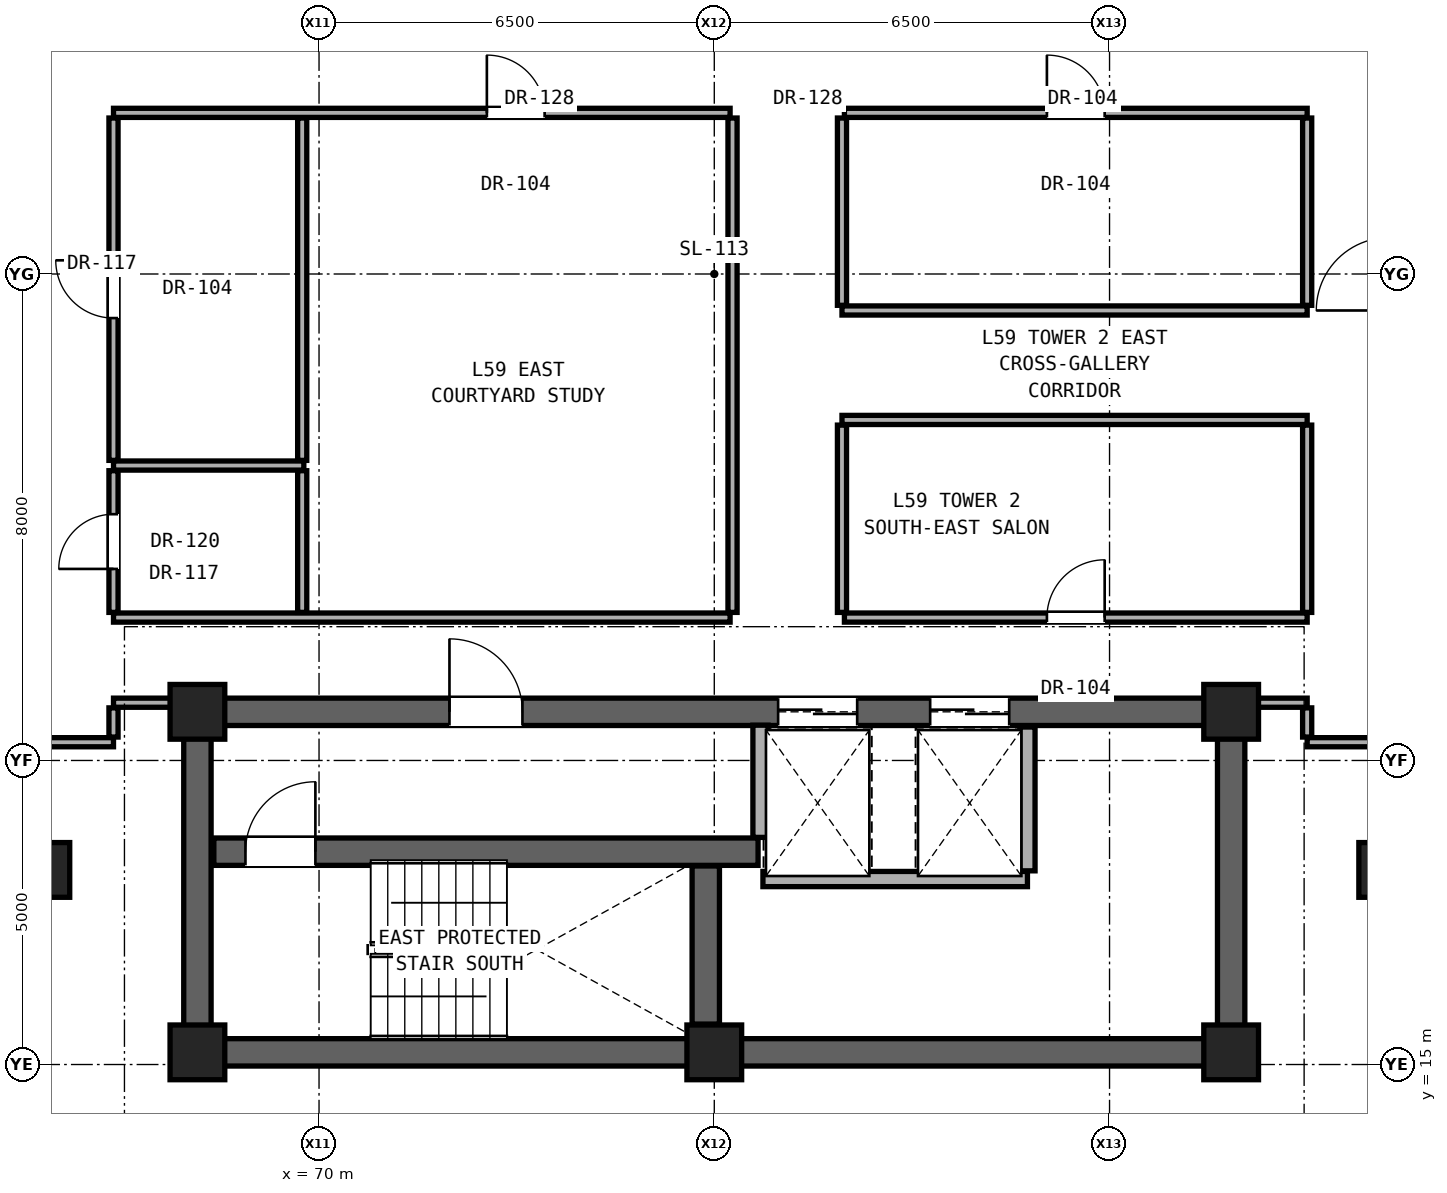
"""IFC4 building model, lengths in metres.
Left out: names, types, materials, properties, quantities, classifications, styles, units other than length and angle.
Written with IfcOpenShell. Run it as: python <this file> out.ifc"""

import sys

from ifc_helpers import new_model, si_unit, direction, frame, frame_2d, origin, origin_2d, place, context, subcontext, project, spatial, rectangle, extrude, element, fill, save


model = new_model("IFC4")
c1 = context("Model", 3, precision=1e-05, world=origin(), true_north=direction((0.0, 1.0)))
c2 = subcontext(c1, "Body", "Model", "MODEL_VIEW")
j1 = project(units=[si_unit("LENGTHUNIT", "METRE"), si_unit("PLANEANGLEUNIT", "RADIAN")], contexts=[c1])
p1 = place(None, origin())
s1 = spatial("IfcSite", under=j1, at=p1, CompositionType="ELEMENT")
p2 = place(p1, origin())
s2 = spatial("IfcBuilding", under=s1, at=p2, CompositionType="ELEMENT")
p3 = place(p2, frame((0.0, 0.0, 206.4)))
s3 = spatial("IfcBuildingStorey", under=s2, at=p3, CompositionType="ELEMENT", Elevation=206.4)
for number, where, z_axis, x_axis in (
    (1, (68.0, 15.2, 0.0), (0.0, 0.0, 1.0), (1.0, 0.0, 0.0)),
    (2, (76.5, 15.2, 0.0), (0.0, 0.0, 1.0), (1.0, 0.0, 0.0)),
    (3, (85.0, 15.2, 0.0), (0.0, 0.0, 1.0), (1.0, 0.0, 0.0)),
    (4, (68.0, 20.8, 0.0), (0.0, 0.0, 1.0), (1.0, 0.0, 0.0)),
    (5, (85.0, 20.8, 0.0), (0.0, 0.0, 1.0), (1.0, 0.0, 0.0)),
):
    element("IfcColumn", number, at=place(p3, frame(where, z_axis=z_axis, x_axis=x_axis)), inside=s3, PredefinedType="COLUMN", context=c2, shape_type="SweptSolid", body=[
        extrude(rectangle(XDim=0.9, YDim=0.9, at=origin_2d()), origin(), (0.0, 0.0, 1.0), 3.25),
    ])
for number, where, z_axis, x_axis in (
    (6, (65.6, 18.2, 0.0), (0.0, 0.0, 1.0), (1.0, 0.0, 0.0)),
    (7, (87.4, 18.2, 0.0), (0.0, 0.0, 1.0), (1.0, 0.0, 0.0)),
):
    element("IfcColumn", number, at=place(p3, frame(where, z_axis=z_axis, x_axis=x_axis)), inside=s3, PredefinedType="PILASTER", context=c2, shape_type="SweptSolid", body=[
        extrude(rectangle(XDim=0.6, YDim=0.9, at=origin_2d()), origin(), (0.0, 0.0, 1.0), 3.25),
    ])
p4 = place(p3, frame((68.0, 15.2, 0.0), z_axis=(0.0, 0.0, 1.0), x_axis=(1.0, 0.0, 0.0)))
e8 = element("IfcWall", 8, at=p4, inside=s3, PredefinedType="SHEAR", context=c2, shape_type="SweptSolid", body=[
    extrude(rectangle(XDim=17.0, YDim=0.45, at=frame_2d((8.5, 0.0))), origin(), (0.0, 0.0, 1.0), 2.6),
])
for number, where, z_axis, x_axis in (
    (9, (68.0, 15.2, 0.0), (0.0, 0.0, 1.0), (0.0, 1.0, 0.0)),
    (10, (85.0, 15.2, 0.0), (0.0, 0.0, 1.0), (0.0, 1.0, 0.0)),
):
    element("IfcWall", number, at=place(p3, frame(where, z_axis=z_axis, x_axis=x_axis)), inside=s3, PredefinedType="SHEAR", context=c2, shape_type="SweptSolid", body=[
        extrude(rectangle(XDim=5.6, YDim=0.45, at=frame_2d((2.8, 0.0))), origin(), (0.0, 0.0, 1.0), 2.6),
    ])
p5 = place(p3, frame((68.0, 20.8, 0.0), z_axis=(0.0, 0.0, 1.0), x_axis=(1.0, 0.0, 0.0)))
e11 = element("IfcWall", 11, at=p5, inside=s3, PredefinedType="SHEAR", context=c2, shape_type="SweptSolid", body=[
    extrude(rectangle(XDim=17.0, YDim=0.45, at=frame_2d((8.5, 0.0))), origin(), (0.0, 0.0, 1.0), 2.6),
])
p6 = place(p5, frame((4.145, 0.0, 0.0)))
e12 = element("IfcOpeningElement", 12, at=p6, cuts=e11, PredefinedType="OPENING", context=c2, shape_type="SweptSolid", body=[
    extrude(rectangle(XDim=1.2, YDim=2.25, at=frame_2d((0.6, 1.125))), frame((0.0, 0.235, 0.0), z_axis=(0.0, -1.0, 0.0), x_axis=(1.0, 0.0, 0.0)), (0.0, 0.0, 1.0), 0.47),
])
p7 = place(p5, frame((9.55, 0.0, 0.0)))
e13 = element("IfcOpeningElement", 13, at=p7, cuts=e11, PredefinedType="OPENING", context=c2, shape_type="SweptSolid", body=[
    extrude(rectangle(XDim=1.3, YDim=2.3, at=frame_2d((0.65, 1.15))), frame((0.0, 0.235, 0.0), z_axis=(0.0, -1.0, 0.0), x_axis=(1.0, 0.0, 0.0)), (0.0, 0.0, 1.0), 0.47),
])
p8 = place(p5, frame((12.05, 0.0, 0.0)))
e14 = element("IfcOpeningElement", 14, at=p8, cuts=e11, PredefinedType="OPENING", context=c2, shape_type="SweptSolid", body=[
    extrude(rectangle(XDim=1.3, YDim=2.3, at=frame_2d((0.65, 1.15))), frame((0.0, 0.235, 0.0), z_axis=(0.0, -1.0, 0.0), x_axis=(1.0, 0.0, 0.0)), (0.0, 0.0, 1.0), 0.47),
])
p9 = place(p3, frame((77.3, 18.05, 0.0), z_axis=(0.0, 0.0, 1.0), x_axis=(1.0, 0.0, 0.0)))
e15 = element("IfcWall", 15, at=p9, inside=s3, PredefinedType="SOLIDWALL", context=c2, shape_type="SweptSolid", body=[
    extrude(rectangle(XDim=4.35, YDim=0.25, at=frame_2d((2.175, 0.0))), origin(), (0.0, 0.0, 1.0), 2.6),
])
p10 = place(p3, frame((68.27, 18.5, 0.0), z_axis=(0.0, 0.0, 1.0), x_axis=(1.0, 0.0, 0.0)))
e16 = element("IfcWall", 16, at=p10, inside=s3, PredefinedType="SHEAR", context=c2, shape_type="SweptSolid", body=[
    extrude(rectangle(XDim=8.95, YDim=0.45, at=frame_2d((4.475, 0.0))), origin(), (0.0, 0.0, 1.0), 2.6),
])
p11 = place(p10, frame((0.52, 0.0, 0.0)))
e17 = element("IfcOpeningElement", 17, at=p11, cuts=e16, PredefinedType="OPENING", context=c2, shape_type="SweptSolid", body=[
    extrude(rectangle(XDim=1.15, YDim=2.2, at=frame_2d((0.575, 1.1))), frame((0.0, 0.235, 0.0), z_axis=(0.0, -1.0, 0.0), x_axis=(1.0, 0.0, 0.0)), (0.0, 0.0, 1.0), 0.47),
])
p12 = place(p3, frame((65.25, 20.3, 0.0), z_axis=(0.0, 0.0, 1.0), x_axis=(1.0, 0.0, 0.0)))
e18 = element("IfcWall", 18, at=p12, inside=s3, PredefinedType="PARTITIONING", context=c2, shape_type="SweptSolid", body=[
    extrude(rectangle(XDim=1.37, YDim=0.15, at=frame_2d((0.685, 0.0))), origin(), (0.0, 0.0, 1.0), 2.6),
])
p13 = place(p3, frame((86.25, 20.3, 0.0), z_axis=(0.0, 0.0, 1.0), x_axis=(1.0, 0.0, 0.0)))
e19 = element("IfcWall", 19, at=p13, inside=s3, PredefinedType="PARTITIONING", context=c2, shape_type="SweptSolid", body=[
    extrude(rectangle(XDim=1.35, YDim=0.15, at=frame_2d((0.675, 0.0))), origin(), (0.0, 0.0, 1.0), 2.6),
])
p14 = place(p3, frame((66.62, 20.95, 0.0), z_axis=(0.0, 0.0, 1.0), x_axis=(1.0, 0.0, 0.0)))
e20 = element("IfcWall", 20, at=p14, inside=s3, PredefinedType="PARTITIONING", context=c2, shape_type="SweptSolid", body=[
    extrude(rectangle(XDim=1.16, YDim=0.15, at=frame_2d((0.58, 0.0))), origin(), (0.0, 0.0, 1.0), 2.262),
])
p15 = place(p3, frame((85.22, 20.95, 0.0), z_axis=(0.0, 0.0, 1.0), x_axis=(1.0, 0.0, 0.0)))
e21 = element("IfcWall", 21, at=p15, inside=s3, PredefinedType="PARTITIONING", context=c2, shape_type="SweptSolid", body=[
    extrude(rectangle(XDim=1.03, YDim=0.15, at=frame_2d((0.515, 0.0))), origin(), (0.0, 0.0, 1.0), 2.262),
])
p16 = place(p3, frame((66.62, 22.35, 0.0), z_axis=(0.0, 0.0, 1.0), x_axis=(1.0, 0.0, 0.0)))
e22 = element("IfcWall", 22, at=p16, inside=s3, PredefinedType="PARTITIONING", context=c2, shape_type="SweptSolid", body=[
    extrude(rectangle(XDim=10.14, YDim=0.15, at=frame_2d((5.07, 0.0))), origin(), (0.0, 0.0, 1.0), 2.175),
])
p17 = place(p3, frame((78.64, 22.35, 0.0), z_axis=(0.0, 0.0, 1.0), x_axis=(1.0, 0.0, 0.0)))
e23 = element("IfcWall", 23, at=p17, inside=s3, PredefinedType="PARTITIONING", context=c2, shape_type="SweptSolid", body=[
    extrude(rectangle(XDim=7.61, YDim=0.15, at=frame_2d((3.805, 0.0))), origin(), (0.0, 0.0, 1.0), 2.175),
])
p18 = place(p17, frame((3.33, 0.0, 0.0)))
e24 = element("IfcOpeningElement", 24, at=p18, cuts=e23, PredefinedType="OPENING", context=c2, shape_type="SweptSolid", body=[
    extrude(rectangle(XDim=0.95, YDim=2.15, at=frame_2d((0.475, 1.075))), frame((0.0, 0.085, 0.0), z_axis=(0.0, -1.0, 0.0), x_axis=(1.0, 0.0, 0.0)), (0.0, 0.0, 1.0), 0.17),
])
p19 = place(p3, frame((66.62, 24.85, 0.0), z_axis=(0.0, 0.0, 1.0), x_axis=(1.0, 0.0, 0.0)))
e25 = element("IfcWall", 25, at=p19, inside=s3, PredefinedType="PARTITIONING", context=c2, shape_type="SweptSolid", body=[
    extrude(rectangle(XDim=3.13, YDim=0.15, at=frame_2d((1.565, 0.0))), origin(), (0.0, 0.0, 1.0), 2.262),
])
for number, where, z_axis, x_axis in (
    (26, (78.6, 25.6, 0.0), (0.0, 0.0, 1.0), (1.0, 0.0, 0.0)),
    (27, (78.6, 27.4, 0.0), (0.0, 0.0, 1.0), (1.0, 0.0, 0.0)),
):
    element("IfcWall", number, at=place(p3, frame(where, z_axis=z_axis, x_axis=x_axis)), inside=s3, PredefinedType="PARTITIONING", context=c2, shape_type="SweptSolid", body=[
        extrude(rectangle(XDim=7.65, YDim=0.15, at=frame_2d((3.825, 0.0))), origin(), (0.0, 0.0, 1.0), 2.175),
    ])
p20 = place(p3, frame((66.62, 30.65, 0.0), z_axis=(0.0, 0.0, 1.0), x_axis=(1.0, 0.0, 0.0)))
e28 = element("IfcWall", 28, at=p20, inside=s3, PredefinedType="PARTITIONING", context=c2, shape_type="SweptSolid", body=[
    extrude(rectangle(XDim=10.14, YDim=0.15, at=frame_2d((5.07, 0.0))), origin(), (0.0, 0.0, 1.0), 2.175),
])
p21 = place(p20, frame((6.14, 0.0, 0.0)))
e29 = element("IfcOpeningElement", 29, at=p21, cuts=e28, PredefinedType="OPENING", context=c2, shape_type="SweptSolid", body=[
    extrude(rectangle(XDim=0.95, YDim=2.15, at=frame_2d((0.475, 1.075))), frame((0.0, 0.085, 0.0), z_axis=(0.0, -1.0, 0.0), x_axis=(1.0, 0.0, 0.0)), (0.0, 0.0, 1.0), 0.17),
])
p22 = place(p3, frame((78.64, 30.65, 0.0), z_axis=(0.0, 0.0, 1.0), x_axis=(1.0, 0.0, 0.0)))
e30 = element("IfcWall", 30, at=p22, inside=s3, PredefinedType="PARTITIONING", context=c2, shape_type="SweptSolid", body=[
    extrude(rectangle(XDim=7.61, YDim=0.15, at=frame_2d((3.805, 0.0))), origin(), (0.0, 0.0, 1.0), 2.175),
])
p23 = place(p22, frame((3.33, 0.0, 0.0)))
e31 = element("IfcOpeningElement", 31, at=p23, cuts=e30, PredefinedType="OPENING", context=c2, shape_type="SweptSolid", body=[
    extrude(rectangle(XDim=0.95, YDim=2.15, at=frame_2d((0.475, 1.075))), frame((0.0, 0.085, 0.0), z_axis=(0.0, -1.0, 0.0), x_axis=(1.0, 0.0, 0.0)), (0.0, 0.0, 1.0), 0.17),
])
p24 = place(p3, frame((66.62, 20.385, 0.0), z_axis=(0.0, 0.0, 1.0), x_axis=(0.0, 1.0, 0.0)))
e32 = element("IfcWall", 32, at=p24, inside=s3, PredefinedType="PARTITIONING", context=c2, shape_type="SweptSolid", body=[
    extrude(rectangle(XDim=0.48, YDim=0.15, at=frame_2d((0.24, 0.0))), origin(), (0.0, 0.0, 1.0), 2.262),
])
p25 = place(p3, frame((66.62, 22.435, 0.0), z_axis=(0.0, 0.0, 1.0), x_axis=(0.0, 1.0, 0.0)))
e33 = element("IfcWall", 33, at=p25, inside=s3, PredefinedType="PARTITIONING", context=c2, shape_type="SweptSolid", body=[
    extrude(rectangle(XDim=2.33, YDim=0.15, at=frame_2d((1.165, 0.0))), origin(), (0.0, 0.0, 1.0), 2.6),
])
p26 = place(p25, frame((0.715, 0.0, 0.0)))
e34 = element("IfcOpeningElement", 34, at=p26, cuts=e33, PredefinedType="OPENING", context=c2, shape_type="SweptSolid", body=[
    extrude(rectangle(XDim=0.9, YDim=2.1, at=frame_2d((0.45, 1.05))), frame((0.0, 0.085, 0.0), z_axis=(0.0, -1.0, 0.0), x_axis=(1.0, 0.0, 0.0)), (0.0, 0.0, 1.0), 0.17),
])
p27 = place(p3, frame((66.62, 24.935, 0.0), z_axis=(0.0, 0.0, 1.0), x_axis=(0.0, 1.0, 0.0)))
e35 = element("IfcWall", 35, at=p27, inside=s3, PredefinedType="PARTITIONING", context=c2, shape_type="SweptSolid", body=[
    extrude(rectangle(XDim=5.63, YDim=0.15, at=frame_2d((2.815, 0.0))), origin(), (0.0, 0.0, 1.0), 2.262),
])
p28 = place(p27, frame((2.34, 0.0, 0.0)))
e36 = element("IfcOpeningElement", 36, at=p28, cuts=e35, PredefinedType="OPENING", context=c2, shape_type="SweptSolid", body=[
    extrude(rectangle(XDim=0.95, YDim=2.15, at=frame_2d((0.475, 1.075))), frame((0.0, 0.085, 0.0), z_axis=(0.0, -1.0, 0.0), x_axis=(1.0, 0.0, 0.0)), (0.0, 0.0, 1.0), 0.17),
])
p29 = place(p3, frame((69.723, 22.435, 0.0), z_axis=(0.0, 0.0, 1.0), x_axis=(0.0, 1.0, 0.0)))
e37 = element("IfcWall", 37, at=p29, inside=s3, PredefinedType="PARTITIONING", context=c2, shape_type="SweptSolid", body=[
    extrude(rectangle(XDim=2.33, YDim=0.15, at=frame_2d((1.165, 0.0))), origin(), (0.0, 0.0, 1.0), 2.6),
])
p30 = place(p3, frame((69.723, 24.935, 0.0), z_axis=(0.0, 0.0, 1.0), x_axis=(0.0, 1.0, 0.0)))
e38 = element("IfcWall", 38, at=p30, inside=s3, PredefinedType="PARTITIONING", context=c2, shape_type="SweptSolid", body=[
    extrude(rectangle(XDim=5.63, YDim=0.15, at=frame_2d((2.815, 0.0))), origin(), (0.0, 0.0, 1.0), 2.262),
])
p31 = place(p3, frame((76.36, 15.665, 0.0), z_axis=(0.0, 0.0, 1.0), x_axis=(0.0, 1.0, 0.0)))
e39 = element("IfcWall", 39, at=p31, inside=s3, PredefinedType="SHEAR", context=c2, shape_type="SweptSolid", body=[
    extrude(rectangle(XDim=2.6, YDim=0.45, at=frame_2d((1.3, 0.0))), origin(), (0.0, 0.0, 1.0), 2.6),
])
p32 = place(p3, frame((76.8, 22.435, 0.0), z_axis=(0.0, 0.0, 1.0), x_axis=(0.0, 1.0, 0.0)))
e40 = element("IfcWall", 40, at=p32, inside=s3, PredefinedType="PARTITIONING", context=c2, shape_type="SweptSolid", body=[
    extrude(rectangle(XDim=8.13, YDim=0.15, at=frame_2d((4.065, 0.0))), origin(), (0.0, 0.0, 1.0), 2.262),
])
p33 = place(p3, frame((77.26, 18.735, 0.0), z_axis=(0.0, 0.0, 1.0), x_axis=(0.0, 1.0, 0.0)))
e41 = element("IfcWall", 41, at=p33, inside=s3, PredefinedType="SOLIDWALL", context=c2, shape_type="SweptSolid", body=[
    extrude(rectangle(XDim=1.845, YDim=0.25, at=frame_2d((0.922, 0.0))), origin(), (0.0, 0.0, 1.0), 2.6),
])
p34 = place(p3, frame((78.6, 22.435, 0.0), z_axis=(0.0, 0.0, 1.0), x_axis=(0.0, 1.0, 0.0)))
e42 = element("IfcWall", 42, at=p34, inside=s3, PredefinedType="PARTITIONING", context=c2, shape_type="SweptSolid", body=[
    extrude(rectangle(XDim=3.08, YDim=0.15, at=frame_2d((1.54, 0.0))), origin(), (0.0, 0.0, 1.0), 2.6),
])
p35 = place(p3, frame((78.6, 27.485, 0.0), z_axis=(0.0, 0.0, 1.0), x_axis=(0.0, 1.0, 0.0)))
e43 = element("IfcWall", 43, at=p35, inside=s3, PredefinedType="PARTITIONING", context=c2, shape_type="SweptSolid", body=[
    extrude(rectangle(XDim=3.08, YDim=0.15, at=frame_2d((1.54, 0.0))), origin(), (0.0, 0.0, 1.0), 2.262),
])
p36 = place(p3, frame((81.65, 18.185, 0.0), z_axis=(0.0, 0.0, 1.0), x_axis=(0.0, 1.0, 0.0)))
e44 = element("IfcWall", 44, at=p36, inside=s3, PredefinedType="SOLIDWALL", context=c2, shape_type="SweptSolid", body=[
    extrude(rectangle(XDim=2.365, YDim=0.25, at=frame_2d((1.183, 0.0))), origin(), (0.0, 0.0, 1.0), 2.6),
])
p37 = place(p3, frame((86.25, 20.385, 0.0), z_axis=(0.0, 0.0, 1.0), x_axis=(0.0, 1.0, 0.0)))
e45 = element("IfcWall", 45, at=p37, inside=s3, PredefinedType="PARTITIONING", context=c2, shape_type="SweptSolid", body=[
    extrude(rectangle(XDim=0.48, YDim=0.15, at=frame_2d((0.24, 0.0))), origin(), (0.0, 0.0, 1.0), 2.262),
])
p38 = place(p3, frame((86.25, 22.435, 0.0), z_axis=(0.0, 0.0, 1.0), x_axis=(0.0, 1.0, 0.0)))
e46 = element("IfcWall", 46, at=p38, inside=s3, PredefinedType="PARTITIONING", context=c2, shape_type="SweptSolid", body=[
    extrude(rectangle(XDim=3.08, YDim=0.15, at=frame_2d((1.54, 0.0))), origin(), (0.0, 0.0, 1.0), 2.6),
])
p39 = place(p3, frame((86.25, 27.485, 0.0), z_axis=(0.0, 0.0, 1.0), x_axis=(0.0, 1.0, 0.0)))
e47 = element("IfcWall", 47, at=p39, inside=s3, PredefinedType="PARTITIONING", context=c2, shape_type="SweptSolid", body=[
    extrude(rectangle(XDim=3.08, YDim=0.15, at=frame_2d((1.54, 0.0))), origin(), (0.0, 0.0, 1.0), 2.262),
])
p40 = place(p6, origin())
e48 = element("IfcDoor", 48, at=p40, inside=s3, OperationType="SINGLE_SWING_LEFT", PredefinedType="DOOR", context=c2, shape_type="SweptSolid", body=[
    extrude(rectangle(XDim=1.2, YDim=2.25, at=frame_2d((0.6, 1.125))), frame((0.0, 0.025, 0.0), z_axis=(0.0, -1.0, 0.0), x_axis=(1.0, 0.0, 0.0)), (0.0, 0.0, 1.0), 0.05),
])
fill(e12, e48)
p41 = place(p11, origin())
e49 = element("IfcDoor", 49, at=p41, inside=s3, OperationType="SINGLE_SWING_RIGHT", PredefinedType="DOOR", context=c2, shape_type="SweptSolid", body=[
    extrude(rectangle(XDim=1.15, YDim=2.2, at=frame_2d((0.575, 1.1))), frame((0.0, 0.025, 0.0), z_axis=(0.0, -1.0, 0.0), x_axis=(1.0, 0.0, 0.0)), (0.0, 0.0, 1.0), 0.05),
])
fill(e17, e49)
p42 = place(p26, origin())
e50 = element("IfcDoor", 50, at=p42, inside=s3, OperationType="SINGLE_SWING_LEFT", PredefinedType="DOOR", context=c2, shape_type="SweptSolid", body=[
    extrude(rectangle(XDim=0.9, YDim=2.1, at=frame_2d((0.45, 1.05))), frame((0.0, 0.025, 0.0), z_axis=(0.0, -1.0, 0.0), x_axis=(1.0, 0.0, 0.0)), (0.0, 0.0, 1.0), 0.05),
])
fill(e34, e50)
p43 = place(p28, origin())
e51 = element("IfcDoor", 51, at=p43, inside=s3, OperationType="SINGLE_SWING_RIGHT", PredefinedType="DOOR", context=c2, shape_type="SweptSolid", body=[
    extrude(rectangle(XDim=0.95, YDim=2.15, at=frame_2d((0.475, 1.075))), frame((0.0, 0.025, 0.0), z_axis=(0.0, -1.0, 0.0), x_axis=(1.0, 0.0, 0.0)), (0.0, 0.0, 1.0), 0.05),
])
fill(e36, e51)
p44 = place(p21, origin())
e52 = element("IfcDoor", 52, at=p44, inside=s3, OperationType="SINGLE_SWING_LEFT", PredefinedType="DOOR", context=c2, shape_type="SweptSolid", body=[
    extrude(rectangle(XDim=0.95, YDim=2.15, at=frame_2d((0.475, 1.075))), frame((0.0, 0.025, 0.0), z_axis=(0.0, -1.0, 0.0), x_axis=(1.0, 0.0, 0.0)), (0.0, 0.0, 1.0), 0.05),
])
fill(e29, e52)
p45 = place(p18, origin())
e53 = element("IfcDoor", 53, at=p45, inside=s3, OperationType="SINGLE_SWING_RIGHT", PredefinedType="DOOR", context=c2, shape_type="SweptSolid", body=[
    extrude(rectangle(XDim=0.95, YDim=2.15, at=frame_2d((0.475, 1.075))), frame((0.0, 0.025, 0.0), z_axis=(0.0, -1.0, 0.0), x_axis=(1.0, 0.0, 0.0)), (0.0, 0.0, 1.0), 0.05),
])
fill(e24, e53)
p46 = place(p23, origin())
e54 = element("IfcDoor", 54, at=p46, inside=s3, OperationType="SINGLE_SWING_LEFT", PredefinedType="DOOR", context=c2, shape_type="SweptSolid", body=[
    extrude(rectangle(XDim=0.95, YDim=2.15, at=frame_2d((0.475, 1.075))), frame((0.0, 0.025, 0.0), z_axis=(0.0, -1.0, 0.0), x_axis=(1.0, 0.0, 0.0)), (0.0, 0.0, 1.0), 0.05),
])
fill(e31, e54)
p47 = place(p7, origin())
e55 = element("IfcDoor", 55, at=p47, inside=s3, OperationType="DOUBLE_DOOR_SLIDING", PredefinedType="DOOR", context=c2, shape_type="SweptSolid", body=[
    extrude(rectangle(XDim=1.3, YDim=2.3, at=frame_2d((0.65, 1.15))), frame((0.0, 0.025, 0.0), z_axis=(0.0, -1.0, 0.0), x_axis=(1.0, 0.0, 0.0)), (0.0, 0.0, 1.0), 0.05),
])
fill(e13, e55)
p48 = place(p8, origin())
e56 = element("IfcDoor", 56, at=p48, inside=s3, OperationType="DOUBLE_DOOR_SLIDING", PredefinedType="DOOR", context=c2, shape_type="SweptSolid", body=[
    extrude(rectangle(XDim=1.3, YDim=2.3, at=frame_2d((0.65, 1.15))), frame((0.0, 0.025, 0.0), z_axis=(0.0, -1.0, 0.0), x_axis=(1.0, 0.0, 0.0)), (0.0, 0.0, 1.0), 0.05),
])
fill(e14, e56)
save(model, sys.argv[1])
